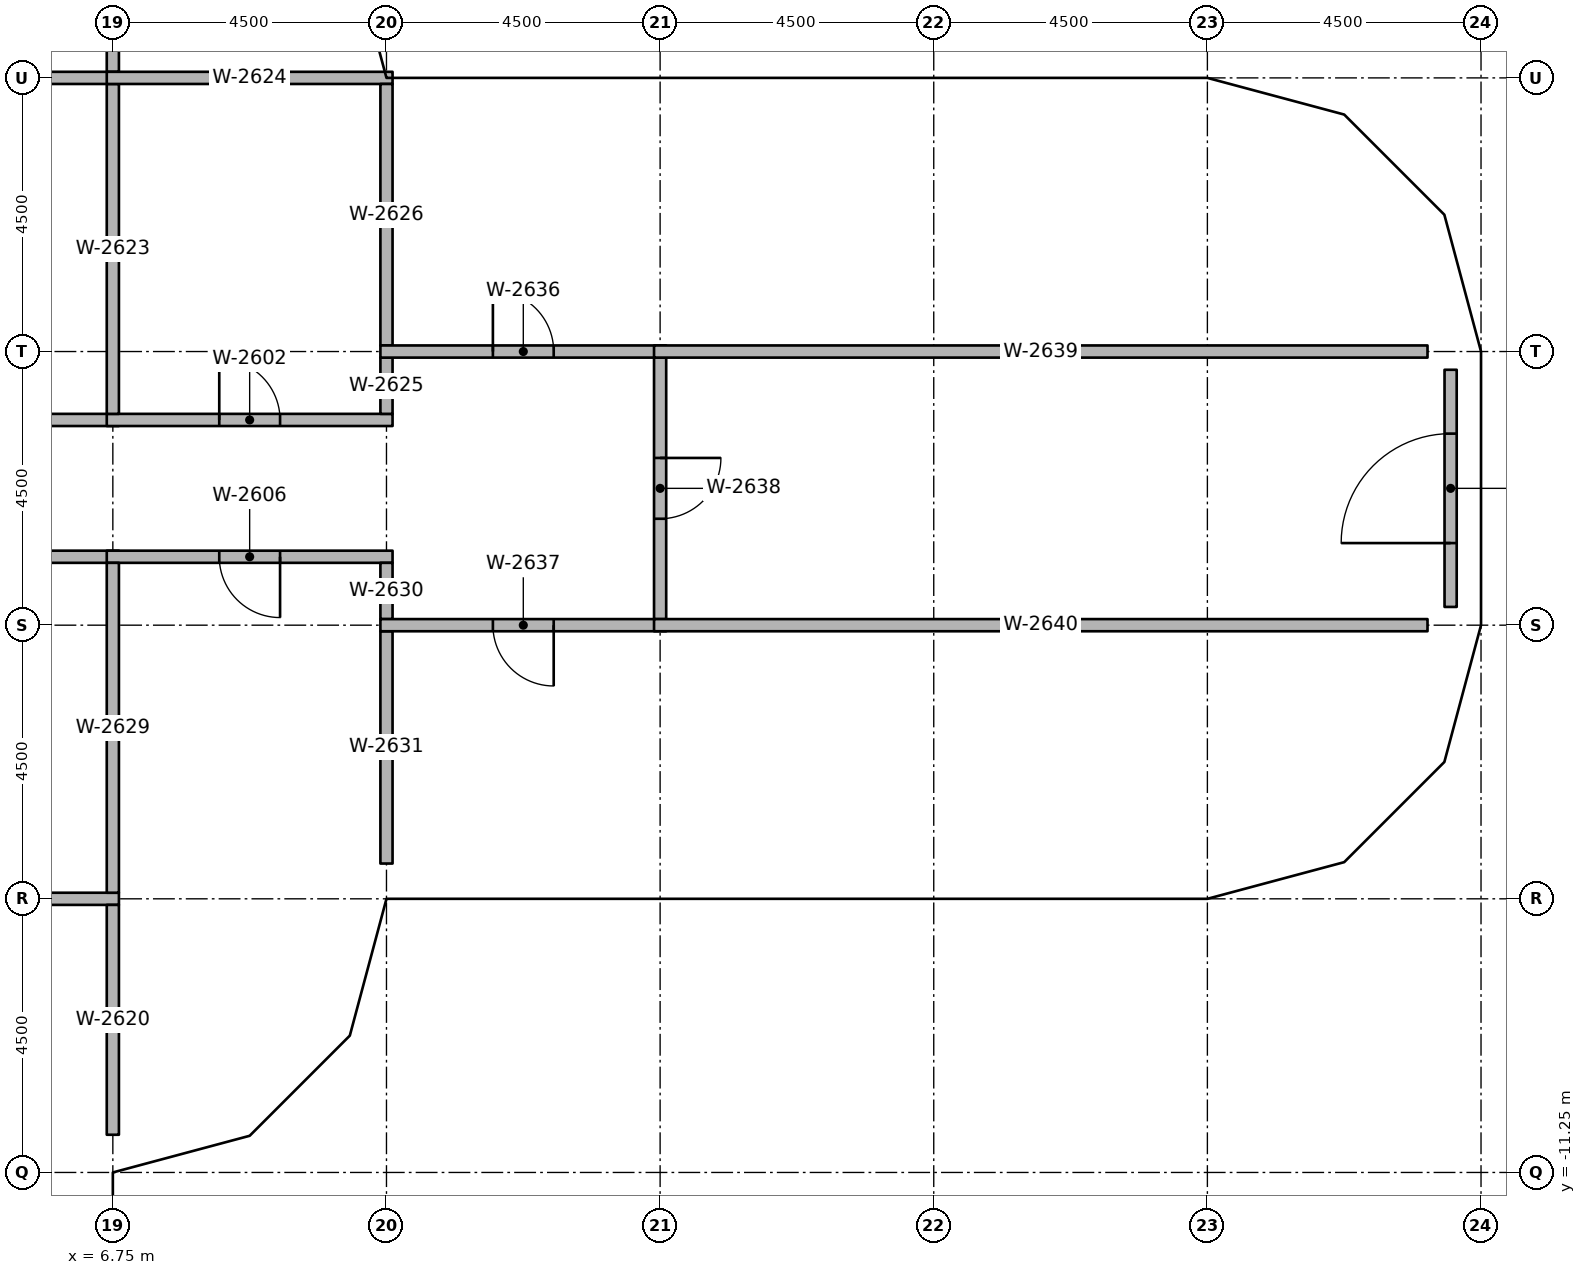
"""IFC4 building model, lengths in metres.
Left out: names, types, materials, properties, quantities, classifications, styles, units other than length and angle.
Written with IfcOpenShell. Run it as: python <this file> out.ifc"""

import sys

from ifc_helpers import new_model, si_unit, direction, frame, frame_2d, origin, origin_2d, place, context, subcontext, project, spatial, rectangle, extrude, element, fill, save


model = new_model("IFC4")
c1 = context("Model", 3, precision=1e-05, world=origin(), true_north=direction((0.0, 1.0)))
c2 = subcontext(c1, "Body", "Model", "MODEL_VIEW")
j1 = project(units=[si_unit("LENGTHUNIT", "METRE"), si_unit("PLANEANGLEUNIT", "RADIAN")], contexts=[c1])
p1 = place(None, origin())
s1 = spatial("IfcSite", under=j1, at=p1, CompositionType="ELEMENT")
p2 = place(p1, origin())
s2 = spatial("IfcBuilding", under=s1, at=p2, CompositionType="ELEMENT")
p3 = place(p2, frame((0.0, 0.0, 249.8)))
s3 = spatial("IfcBuildingStorey", under=s2, at=p3, CompositionType="ELEMENT", Elevation=249.8)
for number, where, z_axis, x_axis in (
    (1, (6.25, -10.75, 0.0), (0.0, 0.0, 1.0), (1.0, 0.0, 0.0)),
    (2, (6.25, -6.25, 0.0), (0.0, 0.0, 1.0), (1.0, 0.0, 0.0)),
    (3, (6.25, 6.25, 0.0), (0.0, 0.0, 1.0), (1.0, 0.0, 0.0)),
    (4, (10.75, -6.25, 0.0), (0.0, 0.0, 1.0), (1.0, 0.0, 0.0)),
    (5, (10.75, 6.25, 0.0), (0.0, 0.0, 1.0), (1.0, 0.0, 0.0)),
    (6, (15.75, -6.25, 0.0), (0.0, 0.0, 1.0), (1.0, 0.0, 0.0)),
    (7, (15.75, 6.25, 0.0), (0.0, 0.0, 1.0), (1.0, 0.0, 0.0)),
    (8, (20.25, -6.11, 0.0), (0.0, 0.0, 1.0), (1.0, 0.0, 0.0)),
    (9, (20.25, 6.11, 0.0), (0.0, 0.0, 1.0), (1.0, 0.0, 0.0)),
    (10, (24.75, -6.11, 0.0), (0.0, 0.0, 1.0), (1.0, 0.0, 0.0)),
    (11, (24.75, 6.11, 0.0), (0.0, 0.0, 1.0), (1.0, 0.0, 0.0)),
    (12, (28.67, -2.25, 0.0), (0.0, 0.0, 1.0), (1.0, 0.0, 0.0)),
    (13, (28.67, 2.25, 0.0), (0.0, 0.0, 1.0), (1.0, 0.0, 0.0)),
):
    element("IfcColumn", number, at=place(p3, frame(where, z_axis=z_axis, x_axis=x_axis)), inside=s3, PredefinedType="COLUMN", context=c2, shape_type="SweptSolid", body=[
        extrude(rectangle(XDim=0.6, YDim=0.6, at=origin_2d()), origin(), (0.0, 0.0, 1.0), 3.65),
    ])
p4 = place(p3, frame((28.75, -1.95, 0.0), z_axis=(0.0, 0.0, 1.0), x_axis=(0.0, 1.0, 0.0)))
e14 = element("IfcWall", 14, at=p4, inside=s3, PredefinedType="SOLIDWALL", context=c2, shape_type="SweptSolid", body=[
    extrude(rectangle(XDim=3.9, YDim=0.2, at=frame_2d((1.95, 0.0))), origin(), (0.0, 0.0, 1.0), 2.75),
])
p5 = place(p4, frame((1.05, 0.0, 0.0)))
e15 = element("IfcOpeningElement", 15, at=p5, cuts=e14, PredefinedType="OPENING", context=c2, shape_type="SweptSolid", body=[
    extrude(rectangle(XDim=1.8, YDim=2.4, at=frame_2d((0.9, 1.2))), frame((0.0, 0.11, 0.0), z_axis=(0.0, -1.0, 0.0), x_axis=(1.0, 0.0, 0.0)), (0.0, 0.0, 1.0), 0.22),
])
p6 = place(p3, frame((1.025, 1.125, 0.0), z_axis=(0.0, 0.0, 1.0), x_axis=(1.0, 0.0, 0.0)))
e16 = element("IfcWall", 16, at=p6, inside=s3, PredefinedType="PARTITIONING", context=c2, shape_type="SweptSolid", body=[
    extrude(rectangle(XDim=5.825, YDim=0.2, at=frame_2d((2.913, 0.0))), origin(), (0.0, 0.0, 1.0), 2.75),
])
p7 = place(p6, frame((2.413, 0.0, 0.0)))
e17 = element("IfcOpeningElement", 17, at=p7, cuts=e16, PredefinedType="OPENING", context=c2, shape_type="SweptSolid", body=[
    extrude(rectangle(XDim=1.0, YDim=2.1, at=frame_2d((0.5, 1.05))), frame((0.0, 0.11, 0.0), z_axis=(0.0, -1.0, 0.0), x_axis=(1.0, 0.0, 0.0)), (0.0, 0.0, 1.0), 0.22),
])
p8 = place(p3, frame((6.65, 1.125, 0.0), z_axis=(0.0, 0.0, 1.0), x_axis=(1.0, 0.0, 0.0)))
e18 = element("IfcWall", 18, at=p8, inside=s3, PredefinedType="PARTITIONING", context=c2, shape_type="SweptSolid", body=[
    extrude(rectangle(XDim=4.7, YDim=0.2, at=frame_2d((2.35, 0.0))), origin(), (0.0, 0.0, 1.0), 2.75),
])
p9 = place(p8, frame((1.85, 0.0, 0.0)))
e19 = element("IfcOpeningElement", 19, at=p9, cuts=e18, PredefinedType="OPENING", context=c2, shape_type="SweptSolid", body=[
    extrude(rectangle(XDim=1.0, YDim=2.1, at=frame_2d((0.5, 1.05))), frame((0.0, 0.11, 0.0), z_axis=(0.0, -1.0, 0.0), x_axis=(1.0, 0.0, 0.0)), (0.0, 0.0, 1.0), 0.22),
])
p10 = place(p3, frame((6.85, -1.125, 0.0), z_axis=(0.0, 0.0, 1.0), x_axis=(-1.0, 0.0, 0.0)))
e20 = element("IfcWall", 20, at=p10, inside=s3, PredefinedType="PARTITIONING", context=c2, shape_type="SweptSolid", body=[
    extrude(rectangle(XDim=5.825, YDim=0.2, at=frame_2d((2.913, 0.0))), origin(), (0.0, 0.0, 1.0), 2.75),
])
p11 = place(p10, frame((2.413, 0.0, 0.0)))
e21 = element("IfcOpeningElement", 21, at=p11, cuts=e20, PredefinedType="OPENING", context=c2, shape_type="SweptSolid", body=[
    extrude(rectangle(XDim=1.0, YDim=2.1, at=frame_2d((0.5, 1.05))), frame((0.0, 0.11, 0.0), z_axis=(0.0, -1.0, 0.0), x_axis=(1.0, 0.0, 0.0)), (0.0, 0.0, 1.0), 0.22),
])
p12 = place(p3, frame((11.35, -1.125, 0.0), z_axis=(0.0, 0.0, 1.0), x_axis=(-1.0, 0.0, 0.0)))
e22 = element("IfcWall", 22, at=p12, inside=s3, PredefinedType="PARTITIONING", context=c2, shape_type="SweptSolid", body=[
    extrude(rectangle(XDim=4.7, YDim=0.2, at=frame_2d((2.35, 0.0))), origin(), (0.0, 0.0, 1.0), 2.75),
])
p13 = place(p12, frame((1.85, 0.0, 0.0)))
e23 = element("IfcOpeningElement", 23, at=p13, cuts=e22, PredefinedType="OPENING", context=c2, shape_type="SweptSolid", body=[
    extrude(rectangle(XDim=1.0, YDim=2.1, at=frame_2d((0.5, 1.05))), frame((0.0, 0.11, 0.0), z_axis=(0.0, -1.0, 0.0), x_axis=(1.0, 0.0, 0.0)), (0.0, 0.0, 1.0), 0.22),
])
p14 = place(p3, frame((1.025, 6.75, 0.0), z_axis=(0.0, 0.0, 1.0), x_axis=(1.0, 0.0, 0.0)))
e24 = element("IfcWall", 24, at=p14, inside=s3, PredefinedType="PARTITIONING", context=c2, shape_type="SweptSolid", body=[
    extrude(rectangle(XDim=5.825, YDim=0.2, at=frame_2d((2.913, 0.0))), origin(), (0.0, 0.0, 1.0), 2.75),
])
p15 = place(p3, frame((6.75, 10.63, 0.0), z_axis=(0.0, 0.0, 1.0), x_axis=(0.0, -1.0, 0.0)))
e25 = element("IfcWall", 25, at=p15, inside=s3, PredefinedType="PARTITIONING", context=c2, shape_type="SweptSolid", body=[
    extrude(rectangle(XDim=3.78, YDim=0.2, at=frame_2d((1.89, 0.0))), origin(), (0.0, 0.0, 1.0), 2.75),
])
p16 = place(p15, frame((1.44, 0.0, 0.0)))
e26 = element("IfcOpeningElement", 26, at=p16, cuts=e25, PredefinedType="OPENING", context=c2, shape_type="SweptSolid", body=[
    extrude(rectangle(XDim=0.9, YDim=2.1, at=frame_2d((0.45, 1.05))), frame((0.0, 0.11, 0.0), z_axis=(0.0, -1.0, 0.0), x_axis=(1.0, 0.0, 0.0)), (0.0, 0.0, 1.0), 0.22),
])
p17 = place(p3, frame((1.025, -6.75, 0.0), z_axis=(0.0, 0.0, 1.0), x_axis=(1.0, 0.0, 0.0)))
e27 = element("IfcWall", 27, at=p17, inside=s3, PredefinedType="PARTITIONING", context=c2, shape_type="SweptSolid", body=[
    extrude(rectangle(XDim=5.825, YDim=0.2, at=frame_2d((2.913, 0.0))), origin(), (0.0, 0.0, 1.0), 2.75),
])
p18 = place(p3, frame((6.75, -10.63, 0.0), z_axis=(0.0, 0.0, 1.0), x_axis=(0.0, 1.0, 0.0)))
e28 = element("IfcWall", 28, at=p18, inside=s3, PredefinedType="PARTITIONING", context=c2, shape_type="SweptSolid", body=[
    extrude(rectangle(XDim=3.78, YDim=0.2, at=frame_2d((1.89, 0.0))), origin(), (0.0, 0.0, 1.0), 2.75),
])
p19 = place(p3, frame((6.75, 1.225, 0.0), z_axis=(0.0, 0.0, 1.0), x_axis=(0.0, 1.0, 0.0)))
e29 = element("IfcWall", 29, at=p19, inside=s3, PredefinedType="PARTITIONING", context=c2, shape_type="SweptSolid", body=[
    extrude(rectangle(XDim=5.425, YDim=0.2, at=frame_2d((2.712, 0.0))), origin(), (0.0, 0.0, 1.0), 2.75),
])
p20 = place(p3, frame((6.65, 6.75, 0.0), z_axis=(0.0, 0.0, 1.0), x_axis=(1.0, 0.0, 0.0)))
e30 = element("IfcWall", 30, at=p20, inside=s3, PredefinedType="PARTITIONING", context=c2, shape_type="SweptSolid", body=[
    extrude(rectangle(XDim=4.7, YDim=0.2, at=frame_2d((2.35, 0.0))), origin(), (0.0, 0.0, 1.0), 2.75),
])
p21 = place(p3, frame((11.25, 1.225, 0.0), z_axis=(0.0, 0.0, 1.0), x_axis=(0.0, 1.0, 0.0)))
e31 = element("IfcWall", 31, at=p21, inside=s3, PredefinedType="PARTITIONING", context=c2, shape_type="SweptSolid", body=[
    extrude(rectangle(XDim=0.925, YDim=0.2, at=frame_2d((0.462, 0.0))), origin(), (0.0, 0.0, 1.0), 2.75),
])
p22 = place(p3, frame((11.25, 2.35, 0.0), z_axis=(0.0, 0.0, 1.0), x_axis=(0.0, 1.0, 0.0)))
e32 = element("IfcWall", 32, at=p22, inside=s3, PredefinedType="PARTITIONING", context=c2, shape_type="SweptSolid", body=[
    extrude(rectangle(XDim=4.3, YDim=0.2, at=frame_2d((2.15, 0.0))), origin(), (0.0, 0.0, 1.0), 2.75),
])
p23 = place(p3, frame((6.75, -6.65, 0.0), z_axis=(0.0, 0.0, 1.0), x_axis=(0.0, 1.0, 0.0)))
e33 = element("IfcWall", 33, at=p23, inside=s3, PredefinedType="PARTITIONING", context=c2, shape_type="SweptSolid", body=[
    extrude(rectangle(XDim=5.425, YDim=0.2, at=frame_2d((2.712, 0.0))), origin(), (0.0, 0.0, 1.0), 2.75),
])
p24 = place(p3, frame((11.25, -2.15, 0.0), z_axis=(0.0, 0.0, 1.0), x_axis=(0.0, 1.0, 0.0)))
e34 = element("IfcWall", 34, at=p24, inside=s3, PredefinedType="PARTITIONING", context=c2, shape_type="SweptSolid", body=[
    extrude(rectangle(XDim=0.925, YDim=0.2, at=frame_2d((0.462, 0.0))), origin(), (0.0, 0.0, 1.0), 2.75),
])
p25 = place(p3, frame((11.25, -6.17, 0.0), z_axis=(0.0, 0.0, 1.0), x_axis=(0.0, 1.0, 0.0)))
e35 = element("IfcWall", 35, at=p25, inside=s3, PredefinedType="PARTITIONING", context=c2, shape_type="SweptSolid", body=[
    extrude(rectangle(XDim=3.82, YDim=0.2, at=frame_2d((1.91, 0.0))), origin(), (0.0, 0.0, 1.0), 2.75),
])
p26 = place(p3, frame((11.15, 2.25, 0.0), z_axis=(0.0, 0.0, 1.0), x_axis=(1.0, 0.0, 0.0)))
e36 = element("IfcWall", 36, at=p26, inside=s3, PredefinedType="PARTITIONING", context=c2, shape_type="SweptSolid", body=[
    extrude(rectangle(XDim=4.7, YDim=0.2, at=frame_2d((2.35, 0.0))), origin(), (0.0, 0.0, 1.0), 2.75),
])
p27 = place(p26, frame((1.85, 0.0, 0.0)))
e37 = element("IfcOpeningElement", 37, at=p27, cuts=e36, PredefinedType="OPENING", context=c2, shape_type="SweptSolid", body=[
    extrude(rectangle(XDim=1.0, YDim=2.1, at=frame_2d((0.5, 1.05))), frame((0.0, 0.11, 0.0), z_axis=(0.0, -1.0, 0.0), x_axis=(1.0, 0.0, 0.0)), (0.0, 0.0, 1.0), 0.22),
])
p28 = place(p3, frame((15.85, -2.25, 0.0), z_axis=(0.0, 0.0, 1.0), x_axis=(-1.0, 0.0, 0.0)))
e38 = element("IfcWall", 38, at=p28, inside=s3, PredefinedType="PARTITIONING", context=c2, shape_type="SweptSolid", body=[
    extrude(rectangle(XDim=4.7, YDim=0.2, at=frame_2d((2.35, 0.0))), origin(), (0.0, 0.0, 1.0), 2.75),
])
p29 = place(p28, frame((1.85, 0.0, 0.0)))
e39 = element("IfcOpeningElement", 39, at=p29, cuts=e38, PredefinedType="OPENING", context=c2, shape_type="SweptSolid", body=[
    extrude(rectangle(XDim=1.0, YDim=2.1, at=frame_2d((0.5, 1.05))), frame((0.0, 0.11, 0.0), z_axis=(0.0, -1.0, 0.0), x_axis=(1.0, 0.0, 0.0)), (0.0, 0.0, 1.0), 0.22),
])
p30 = place(p3, frame((15.75, 2.15, 0.0), z_axis=(0.0, 0.0, 1.0), x_axis=(0.0, -1.0, 0.0)))
e40 = element("IfcWall", 40, at=p30, inside=s3, PredefinedType="PARTITIONING", context=c2, shape_type="SweptSolid", body=[
    extrude(rectangle(XDim=4.3, YDim=0.2, at=frame_2d((2.15, 0.0))), origin(), (0.0, 0.0, 1.0), 2.75),
])
p31 = place(p30, frame((1.65, 0.0, 0.0)))
e41 = element("IfcOpeningElement", 41, at=p31, cuts=e40, PredefinedType="OPENING", context=c2, shape_type="SweptSolid", body=[
    extrude(rectangle(XDim=1.0, YDim=2.1, at=frame_2d((0.5, 1.05))), frame((0.0, 0.11, 0.0), z_axis=(0.0, -1.0, 0.0), x_axis=(1.0, 0.0, 0.0)), (0.0, 0.0, 1.0), 0.22),
])
for number, where, z_axis, x_axis in (
    (42, (15.65, 2.25, 0.0), (0.0, 0.0, 1.0), (1.0, 0.0, 0.0)),
    (43, (15.65, -2.25, 0.0), (0.0, 0.0, 1.0), (1.0, 0.0, 0.0)),
):
    element("IfcWall", number, at=place(p3, frame(where, z_axis=z_axis, x_axis=x_axis)), inside=s3, PredefinedType="PARTITIONING", context=c2, shape_type="SweptSolid", body=[
        extrude(rectangle(XDim=12.72, YDim=0.2, at=frame_2d((6.36, 0.0))), origin(), (0.0, 0.0, 1.0), 2.75),
    ])
p32 = place(p5, origin())
e44 = element("IfcDoor", 44, at=p32, inside=s3, OperationType="SINGLE_SWING_LEFT", PredefinedType="DOOR", context=c2, shape_type="SweptSolid", body=[
    extrude(rectangle(XDim=1.8, YDim=2.4, at=frame_2d((0.9, 1.2))), frame((0.0, 0.025, 0.0), z_axis=(0.0, -1.0, 0.0), x_axis=(1.0, 0.0, 0.0)), (0.0, 0.0, 1.0), 0.05),
])
fill(e15, e44)
p33 = place(p31, origin())
e45 = element("IfcDoor", 45, at=p33, inside=s3, OperationType="SINGLE_SWING_RIGHT", PredefinedType="DOOR", context=c2, shape_type="SweptSolid", body=[
    extrude(rectangle(XDim=1.0, YDim=2.1, at=frame_2d((0.5, 1.05))), frame((0.0, 0.025, 0.0), z_axis=(0.0, -1.0, 0.0), x_axis=(1.0, 0.0, 0.0)), (0.0, 0.0, 1.0), 0.05),
])
fill(e41, e45)
p34 = place(p27, origin())
e46 = element("IfcDoor", 46, at=p34, inside=s3, OperationType="SINGLE_SWING_RIGHT", PredefinedType="DOOR", context=c2, shape_type="SweptSolid", body=[
    extrude(rectangle(XDim=1.0, YDim=2.1, at=frame_2d((0.5, 1.05))), frame((0.0, 0.025, 0.0), z_axis=(0.0, -1.0, 0.0), x_axis=(1.0, 0.0, 0.0)), (0.0, 0.0, 1.0), 0.05),
])
fill(e37, e46)
p35 = place(p29, origin())
e47 = element("IfcDoor", 47, at=p35, inside=s3, OperationType="SINGLE_SWING_RIGHT", PredefinedType="DOOR", context=c2, shape_type="SweptSolid", body=[
    extrude(rectangle(XDim=1.0, YDim=2.1, at=frame_2d((0.5, 1.05))), frame((0.0, 0.025, 0.0), z_axis=(0.0, -1.0, 0.0), x_axis=(1.0, 0.0, 0.0)), (0.0, 0.0, 1.0), 0.05),
])
fill(e39, e47)
p36 = place(p9, origin())
e48 = element("IfcDoor", 48, at=p36, inside=s3, OperationType="SINGLE_SWING_RIGHT", PredefinedType="DOOR", context=c2, shape_type="SweptSolid", body=[
    extrude(rectangle(XDim=1.0, YDim=2.1, at=frame_2d((0.5, 1.05))), frame((0.0, 0.025, 0.0), z_axis=(0.0, -1.0, 0.0), x_axis=(1.0, 0.0, 0.0)), (0.0, 0.0, 1.0), 0.05),
])
fill(e19, e48)
p37 = place(p13, origin())
e49 = element("IfcDoor", 49, at=p37, inside=s3, OperationType="SINGLE_SWING_RIGHT", PredefinedType="DOOR", context=c2, shape_type="SweptSolid", body=[
    extrude(rectangle(XDim=1.0, YDim=2.1, at=frame_2d((0.5, 1.05))), frame((0.0, 0.025, 0.0), z_axis=(0.0, -1.0, 0.0), x_axis=(1.0, 0.0, 0.0)), (0.0, 0.0, 1.0), 0.05),
])
fill(e23, e49)
save(model, sys.argv[1])
